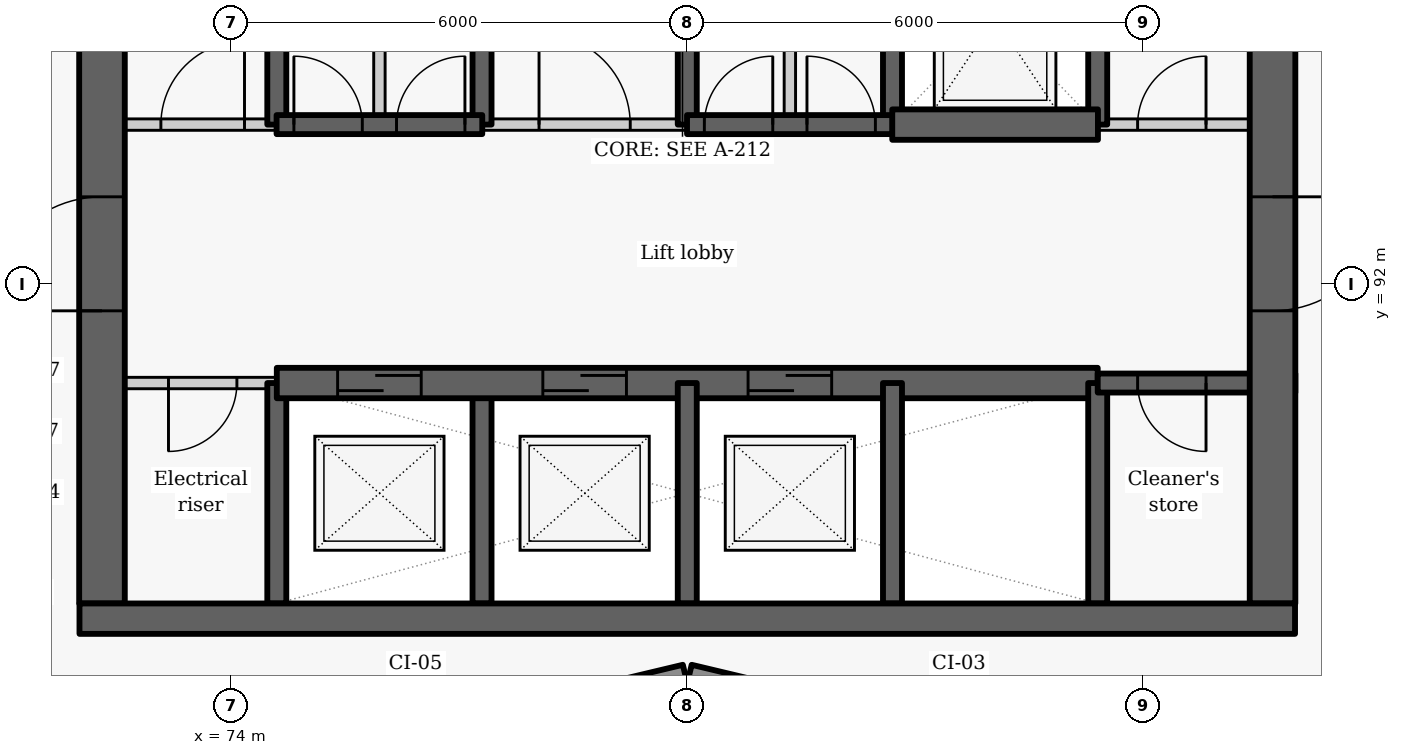
"""IFC4 building model, lengths in metres.
Left out: names, types, materials, properties, quantities, classifications, styles, units other than length and angle.
Written with IfcOpenShell. Run it as: python <this file> out.ifc"""

import sys

from ifc_helpers import new_model, si_unit, direction, frame, frame_2d, origin, place, context, subcontext, project, spatial, rectangle, extrude, element, fill, save


model = new_model("IFC4")
c1 = context("Model", 3, precision=1e-05, world=origin(), true_north=direction((0.0, 1.0)))
c2 = subcontext(c1, "Body", "Model", "MODEL_VIEW")
j1 = project(units=[si_unit("LENGTHUNIT", "METRE"), si_unit("PLANEANGLEUNIT", "RADIAN")], contexts=[c1])
p1 = place(None, origin())
s1 = spatial("IfcSite", under=j1, at=p1, CompositionType="ELEMENT")
p2 = place(p1, origin())
s2 = spatial("IfcBuilding", under=s1, at=p2, CompositionType="ELEMENT")
p3 = place(p2, frame((0.0, 0.0, 51.3)))
s3 = spatial("IfcBuildingStorey", under=s2, at=p3, CompositionType="ELEMENT", Elevation=51.3)
for number, where, z_axis, x_axis in (
    (1, (76.814, 86.119, 0.0), (0.0, 0.0, 1.0), (0.973, 0.232, 0.0)),
    (2, (80.029, 86.872, 0.0), (0.0, 0.0, 1.0), (0.973, -0.232, 0.0)),
):
    element("IfcWall", number, at=place(p3, frame(where, z_axis=z_axis, x_axis=x_axis)), inside=s3, PredefinedType="SOLIDWALL", context=c2, shape_type="SweptSolid", body=[
        extrude(rectangle(XDim=3.246, YDim=0.25, at=frame_2d((1.623, 0.0))), origin(), (0.0, 0.0, 1.0), 2.425),
    ])
p4 = place(p3, frame((74.6, 87.8, -0.275), z_axis=(0.0, 0.0, 1.0), x_axis=(0.0, 1.0, 0.0)))
e3 = element("IfcWall", 3, at=p4, inside=s3, PredefinedType="SHEAR", context=c2, shape_type="SweptSolid", body=[
    extrude(rectangle(XDim=2.9, YDim=0.25, at=frame_2d((1.45, 0.0))), origin(), (0.0, 0.0, 1.0), 3.3),
])
p5 = place(p3, frame((74.6, 94.1, -0.275), z_axis=(0.0, 0.0, 1.0), x_axis=(0.0, 1.0, 0.0)))
e4 = element("IfcWall", 4, at=p5, inside=s3, PredefinedType="SHEAR", context=c2, shape_type="SweptSolid", body=[
    extrude(rectangle(XDim=2.8, YDim=0.25, at=frame_2d((1.4, 0.0))), origin(), (0.0, 0.0, 1.0), 3.3),
])
p6 = place(p3, frame((74.6, 90.7, 0.0), z_axis=(0.0, 0.0, 1.0), x_axis=(-1.0, 0.0, 0.0)))
e5 = element("IfcWall", 5, at=p6, inside=s3, PredefinedType="PARTITIONING", context=c2, shape_type="SweptSolid", body=[
    extrude(rectangle(XDim=2.6, YDim=0.15, at=frame_2d((1.3, 0.0))), origin(), (0.0, 0.0, 1.0), 3.025),
])
p7 = place(p6, frame((0.525, 0.0, 0.0)))
e6 = element("IfcOpeningElement", 6, at=p7, cuts=e5, PredefinedType="OPENING", context=c2, shape_type="SweptSolid", body=[
    extrude(rectangle(XDim=0.9, YDim=2.1, at=frame_2d((0.45, 1.05))), frame((0.0, 0.085, 0.0), z_axis=(0.0, -1.0, 0.0), x_axis=(1.0, 0.0, 0.0)), (0.0, 0.0, 1.0), 0.17),
])
p8 = place(p3, frame((72.3, 87.8, -0.275), z_axis=(0.0, 0.0, 1.0), x_axis=(0.0, 1.0, 0.0)))
e7 = element("IfcWall", 7, at=p8, inside=s3, PredefinedType="SHEAR", context=c2, shape_type="SweptSolid", body=[
    extrude(rectangle(XDim=9.1, YDim=0.6, at=frame_2d((4.55, 0.0))), origin(), (0.0, 0.0, 1.0), 3.3),
])
p9 = place(p8, frame((3.85, 0.0, 0.275)))
e8 = element("IfcOpeningElement", 8, at=p9, cuts=e7, PredefinedType="OPENING", context=c2, shape_type="SweptSolid", body=[
    extrude(rectangle(XDim=1.5, YDim=2.1, at=frame_2d((0.75, 1.05))), frame((0.0, 0.31, 0.0), z_axis=(0.0, -1.0, 0.0), x_axis=(1.0, 0.0, 0.0)), (0.0, 0.0, 1.0), 0.62),
])
p10 = place(p3, frame((77.3, 87.8, -0.275), z_axis=(0.0, 0.0, 1.0), x_axis=(0.0, 1.0, 0.0)))
e9 = element("IfcWall", 9, at=p10, inside=s3, PredefinedType="SHEAR", context=c2, shape_type="SweptSolid", body=[
    extrude(rectangle(XDim=2.9, YDim=0.25, at=frame_2d((1.45, 0.0))), origin(), (0.0, 0.0, 1.0), 3.3),
])
p11 = place(p3, frame((77.3, 94.1, -0.275), z_axis=(0.0, 0.0, 1.0), x_axis=(0.0, 1.0, 0.0)))
e10 = element("IfcWall", 10, at=p11, inside=s3, PredefinedType="SHEAR", context=c2, shape_type="SweptSolid", body=[
    extrude(rectangle(XDim=2.8, YDim=0.25, at=frame_2d((1.4, 0.0))), origin(), (0.0, 0.0, 1.0), 3.3),
])
p12 = place(p3, frame((74.6, 90.7, -0.275), z_axis=(0.0, 0.0, 1.0), x_axis=(1.0, 0.0, 0.0)))
e11 = element("IfcWall", 11, at=p12, inside=s3, PredefinedType="SHEAR", context=c2, shape_type="SweptSolid", body=[
    extrude(rectangle(XDim=10.8, YDim=0.4, at=frame_2d((5.4, 0.0))), origin(), (0.0, 0.0, 1.0), 3.3),
])
p13 = place(p12, frame((0.8, 0.0, 0.275)))
e12 = element("IfcOpeningElement", 12, at=p13, cuts=e11, PredefinedType="OPENING", context=c2, shape_type="SweptSolid", body=[
    extrude(rectangle(XDim=1.1, YDim=2.1, at=frame_2d((0.55, 1.05))), frame((0.0, 0.21, 0.0), z_axis=(0.0, -1.0, 0.0), x_axis=(1.0, 0.0, 0.0)), (0.0, 0.0, 1.0), 0.42),
])
p14 = place(p12, frame((3.5, 0.0, 0.275)))
e13 = element("IfcOpeningElement", 13, at=p14, cuts=e11, PredefinedType="OPENING", context=c2, shape_type="SweptSolid", body=[
    extrude(rectangle(XDim=1.1, YDim=2.1, at=frame_2d((0.55, 1.05))), frame((0.0, 0.21, 0.0), z_axis=(0.0, -1.0, 0.0), x_axis=(1.0, 0.0, 0.0)), (0.0, 0.0, 1.0), 0.42),
])
p15 = place(p12, frame((6.2, 0.0, 0.275)))
e14 = element("IfcOpeningElement", 14, at=p15, cuts=e11, PredefinedType="OPENING", context=c2, shape_type="SweptSolid", body=[
    extrude(rectangle(XDim=1.1, YDim=2.1, at=frame_2d((0.55, 1.05))), frame((0.0, 0.21, 0.0), z_axis=(0.0, -1.0, 0.0), x_axis=(1.0, 0.0, 0.0)), (0.0, 0.0, 1.0), 0.42),
])
p16 = place(p3, frame((80.0, 87.8, -0.275), z_axis=(0.0, 0.0, 1.0), x_axis=(0.0, 1.0, 0.0)))
e15 = element("IfcWall", 15, at=p16, inside=s3, PredefinedType="SHEAR", context=c2, shape_type="SweptSolid", body=[
    extrude(rectangle(XDim=2.9, YDim=0.25, at=frame_2d((1.45, 0.0))), origin(), (0.0, 0.0, 1.0), 3.3),
])
p17 = place(p3, frame((80.0, 94.1, -0.275), z_axis=(0.0, 0.0, 1.0), x_axis=(0.0, 1.0, 0.0)))
e16 = element("IfcWall", 16, at=p17, inside=s3, PredefinedType="SHEAR", context=c2, shape_type="SweptSolid", body=[
    extrude(rectangle(XDim=2.8, YDim=0.25, at=frame_2d((1.4, 0.0))), origin(), (0.0, 0.0, 1.0), 3.3),
])
p18 = place(p3, frame((82.7, 87.8, -0.275), z_axis=(0.0, 0.0, 1.0), x_axis=(0.0, 1.0, 0.0)))
e17 = element("IfcWall", 17, at=p18, inside=s3, PredefinedType="SHEAR", context=c2, shape_type="SweptSolid", body=[
    extrude(rectangle(XDim=2.9, YDim=0.25, at=frame_2d((1.45, 0.0))), origin(), (0.0, 0.0, 1.0), 3.3),
])
p19 = place(p3, frame((82.7, 94.1, -0.275), z_axis=(0.0, 0.0, 1.0), x_axis=(0.0, 1.0, 0.0)))
e18 = element("IfcWall", 18, at=p19, inside=s3, PredefinedType="SHEAR", context=c2, shape_type="SweptSolid", body=[
    extrude(rectangle(XDim=2.8, YDim=0.25, at=frame_2d((1.4, 0.0))), origin(), (0.0, 0.0, 1.0), 3.3),
])
p20 = place(p3, frame((85.4, 87.8, -0.275), z_axis=(0.0, 0.0, 1.0), x_axis=(0.0, 1.0, 0.0)))
e19 = element("IfcWall", 19, at=p20, inside=s3, PredefinedType="SHEAR", context=c2, shape_type="SweptSolid", body=[
    extrude(rectangle(XDim=2.9, YDim=0.25, at=frame_2d((1.45, 0.0))), origin(), (0.0, 0.0, 1.0), 3.3),
])
p21 = place(p3, frame((85.4, 94.1, -0.275), z_axis=(0.0, 0.0, 1.0), x_axis=(0.0, 1.0, 0.0)))
e20 = element("IfcWall", 20, at=p21, inside=s3, PredefinedType="SHEAR", context=c2, shape_type="SweptSolid", body=[
    extrude(rectangle(XDim=2.8, YDim=0.25, at=frame_2d((1.4, 0.0))), origin(), (0.0, 0.0, 1.0), 3.3),
])
p22 = place(p3, frame((88.0, 90.7, -0.275), z_axis=(0.0, 0.0, 1.0), x_axis=(-1.0, 0.0, 0.0)))
e21 = element("IfcWall", 21, at=p22, inside=s3, PredefinedType="SHEAR", context=c2, shape_type="SweptSolid", body=[
    extrude(rectangle(XDim=2.6, YDim=0.25, at=frame_2d((1.3, 0.0))), origin(), (0.0, 0.0, 1.0), 3.3),
])
p23 = place(p22, frame((1.175, 0.0, 0.275)))
e22 = element("IfcOpeningElement", 22, at=p23, cuts=e21, PredefinedType="OPENING", context=c2, shape_type="SweptSolid", body=[
    extrude(rectangle(XDim=0.9, YDim=2.1, at=frame_2d((0.45, 1.05))), frame((0.0, 0.135, 0.0), z_axis=(0.0, -1.0, 0.0), x_axis=(1.0, 0.0, 0.0)), (0.0, 0.0, 1.0), 0.27),
])
p24 = place(p3, frame((87.7, 103.4, -0.275), z_axis=(0.0, 0.0, 1.0), x_axis=(0.0, -1.0, 0.0)))
e23 = element("IfcWall", 23, at=p24, inside=s3, PredefinedType="SHEAR", context=c2, shape_type="SweptSolid", body=[
    extrude(rectangle(XDim=15.6, YDim=0.6, at=frame_2d((7.8, 0.0))), origin(), (0.0, 0.0, 1.0), 3.3),
])
p25 = place(p24, frame((10.25, 0.0, 0.275)))
e24 = element("IfcOpeningElement", 24, at=p25, cuts=e23, PredefinedType="OPENING", context=c2, shape_type="SweptSolid", body=[
    extrude(rectangle(XDim=1.5, YDim=2.1, at=frame_2d((0.75, 1.05))), frame((0.0, 0.31, 0.0), z_axis=(0.0, -1.0, 0.0), x_axis=(1.0, 0.0, 0.0)), (0.0, 0.0, 1.0), 0.62),
])
p26 = place(p24, frame((2.7, 0.0, 0.275)))
e25 = element("IfcOpeningElement", 25, at=p26, cuts=e23, PredefinedType="OPENING", context=c2, shape_type="SweptSolid", body=[
    extrude(rectangle(XDim=1.1, YDim=2.1, at=frame_2d((0.55, 1.05))), frame((0.0, 0.31, 0.0), z_axis=(0.0, -1.0, 0.0), x_axis=(1.0, 0.0, 0.0)), (0.0, 0.0, 1.0), 0.62),
])
p27 = place(p3, frame((72.0, 94.1, 0.0), z_axis=(0.0, 0.0, 1.0), x_axis=(1.0, 0.0, 0.0)))
e26 = element("IfcWall", 26, at=p27, inside=s3, PredefinedType="PARTITIONING", context=c2, shape_type="SweptSolid", body=[
    extrude(rectangle(XDim=2.603, YDim=0.15, at=frame_2d((1.302, 0.0))), origin(), (0.0, 0.0, 1.0), 3.025),
])
p28 = place(p27, frame((1.075, 0.0, 0.0)))
e27 = element("IfcOpeningElement", 27, at=p28, cuts=e26, PredefinedType="OPENING", context=c2, shape_type="SweptSolid", body=[
    extrude(rectangle(XDim=1.1, YDim=2.1, at=frame_2d((0.55, 1.05))), frame((0.0, 0.085, 0.0), z_axis=(0.0, -1.0, 0.0), x_axis=(1.0, 0.0, 0.0)), (0.0, 0.0, 1.0), 0.17),
])
p29 = place(p3, frame((77.297, 94.1, 0.0), z_axis=(0.0, 0.0, 1.0), x_axis=(1.0, 0.0, 0.0)))
e28 = element("IfcWall", 28, at=p29, inside=s3, PredefinedType="PARTITIONING", context=c2, shape_type="SweptSolid", body=[
    extrude(rectangle(XDim=2.706, YDim=0.15, at=frame_2d((1.353, 0.0))), origin(), (0.0, 0.0, 1.0), 3.025),
])
p30 = place(p29, frame((0.753, 0.0, 0.0)))
e29 = element("IfcOpeningElement", 29, at=p30, cuts=e28, PredefinedType="OPENING", context=c2, shape_type="SweptSolid", body=[
    extrude(rectangle(XDim=1.2, YDim=2.1, at=frame_2d((0.6, 1.05))), frame((0.0, 0.085, 0.0), z_axis=(0.0, -1.0, 0.0), x_axis=(1.0, 0.0, 0.0)), (0.0, 0.0, 1.0), 0.17),
])
p31 = place(p3, frame((85.397, 94.1, 0.0), z_axis=(0.0, 0.0, 1.0), x_axis=(1.0, 0.0, 0.0)))
e30 = element("IfcWall", 30, at=p31, inside=s3, PredefinedType="PARTITIONING", context=c2, shape_type="SweptSolid", body=[
    extrude(rectangle(XDim=2.603, YDim=0.15, at=frame_2d((1.302, 0.0))), origin(), (0.0, 0.0, 1.0), 3.025),
])
p32 = place(p31, frame((0.528, 0.0, 0.0)))
e31 = element("IfcOpeningElement", 31, at=p32, cuts=e30, PredefinedType="OPENING", context=c2, shape_type="SweptSolid", body=[
    extrude(rectangle(XDim=0.9, YDim=2.1, at=frame_2d((0.45, 1.05))), frame((0.0, 0.085, 0.0), z_axis=(0.0, -1.0, 0.0), x_axis=(1.0, 0.0, 0.0)), (0.0, 0.0, 1.0), 0.17),
])
p33 = place(p3, frame((74.597, 94.1, -0.275), z_axis=(0.0, 0.0, 1.0), x_axis=(1.0, 0.0, 0.0)))
e32 = element("IfcWall", 32, at=p33, inside=s3, PredefinedType="SHEAR", context=c2, shape_type="SweptSolid", body=[
    extrude(rectangle(XDim=2.706, YDim=0.25, at=frame_2d((1.353, 0.0))), origin(), (0.0, 0.0, 1.0), 3.3),
])
p34 = place(p33, frame((0.228, 0.0, 0.275)))
e33 = element("IfcOpeningElement", 33, at=p34, cuts=e32, PredefinedType="OPENING", context=c2, shape_type="SweptSolid", body=[
    extrude(rectangle(XDim=0.9, YDim=2.1, at=frame_2d((0.45, 1.05))), frame((0.0, 0.135, 0.0), z_axis=(0.0, -1.0, 0.0), x_axis=(1.0, 0.0, 0.0)), (0.0, 0.0, 1.0), 0.27),
])
p35 = place(p33, frame((1.578, 0.0, 0.275)))
e34 = element("IfcOpeningElement", 34, at=p35, cuts=e32, PredefinedType="OPENING", context=c2, shape_type="SweptSolid", body=[
    extrude(rectangle(XDim=0.9, YDim=2.1, at=frame_2d((0.45, 1.05))), frame((0.0, 0.135, 0.0), z_axis=(0.0, -1.0, 0.0), x_axis=(1.0, 0.0, 0.0)), (0.0, 0.0, 1.0), 0.27),
])
p36 = place(p3, frame((79.997, 94.1, -0.275), z_axis=(0.0, 0.0, 1.0), x_axis=(1.0, 0.0, 0.0)))
e35 = element("IfcWall", 35, at=p36, inside=s3, PredefinedType="SHEAR", context=c2, shape_type="SweptSolid", body=[
    extrude(rectangle(XDim=2.706, YDim=0.25, at=frame_2d((1.353, 0.0))), origin(), (0.0, 0.0, 1.0), 3.3),
])
p37 = place(p36, frame((0.228, 0.0, 0.275)))
e36 = element("IfcOpeningElement", 36, at=p37, cuts=e35, PredefinedType="OPENING", context=c2, shape_type="SweptSolid", body=[
    extrude(rectangle(XDim=0.9, YDim=2.1, at=frame_2d((0.45, 1.05))), frame((0.0, 0.135, 0.0), z_axis=(0.0, -1.0, 0.0), x_axis=(1.0, 0.0, 0.0)), (0.0, 0.0, 1.0), 0.27),
])
p38 = place(p36, frame((1.578, 0.0, 0.275)))
e37 = element("IfcOpeningElement", 37, at=p38, cuts=e35, PredefinedType="OPENING", context=c2, shape_type="SweptSolid", body=[
    extrude(rectangle(XDim=0.9, YDim=2.1, at=frame_2d((0.45, 1.05))), frame((0.0, 0.135, 0.0), z_axis=(0.0, -1.0, 0.0), x_axis=(1.0, 0.0, 0.0)), (0.0, 0.0, 1.0), 0.27),
])
p39 = place(p3, frame((82.697, 94.1, -0.275), z_axis=(0.0, 0.0, 1.0), x_axis=(1.0, 0.0, 0.0)))
e38 = element("IfcWall", 38, at=p39, inside=s3, PredefinedType="SHEAR", context=c2, shape_type="SweptSolid", body=[
    extrude(rectangle(XDim=2.706, YDim=0.4, at=frame_2d((1.353, 0.0))), origin(), (0.0, 0.0, 1.0), 3.3),
])
for number, where, z_axis, x_axis in (
    (39, (75.95, 94.1, 0.0), (0.0, 0.0, 1.0), (0.0, 1.0, 0.0)),
    (40, (81.35, 94.1, 0.0), (0.0, 0.0, 1.0), (0.0, 1.0, 0.0)),
):
    element("IfcWall", number, at=place(p3, frame(where, z_axis=z_axis, x_axis=x_axis)), inside=s3, PredefinedType="PARTITIONING", context=c2, shape_type="SweptSolid", body=[
        extrude(rectangle(XDim=2.8, YDim=0.15, at=frame_2d((1.4, 0.0))), origin(), (0.0, 0.0, 1.0), 3.025),
    ])
p40 = place(p3, frame((72.004, 87.6, -0.275), z_axis=(0.0, 0.0, 1.0), x_axis=(1.0, 0.0, 0.0)))
e41 = element("IfcWall", 41, at=p40, inside=s3, PredefinedType="SHEAR", context=c2, shape_type="SweptSolid", body=[
    extrude(rectangle(XDim=15.992, YDim=0.4, at=frame_2d((7.996, 0.0))), origin(), (0.0, 0.0, 1.0), 3.3),
])
p41 = place(p7, origin())
e42 = element("IfcDoor", 42, at=p41, inside=s3, OperationType="SINGLE_SWING_RIGHT", PredefinedType="DOOR", context=c2, shape_type="SweptSolid", body=[
    extrude(rectangle(XDim=0.9, YDim=2.1, at=frame_2d((0.45, 1.05))), frame((0.0, 0.025, 0.0), z_axis=(0.0, -1.0, 0.0), x_axis=(1.0, 0.0, 0.0)), (0.0, 0.0, 1.0), 0.05),
])
fill(e6, e42)
p42 = place(p13, origin())
e43 = element("IfcDoor", 43, at=p42, inside=s3, OperationType="SLIDING_TO_LEFT", PredefinedType="DOOR", context=c2, shape_type="SweptSolid", body=[
    extrude(rectangle(XDim=1.1, YDim=2.1, at=frame_2d((0.55, 1.05))), frame((0.0, 0.025, 0.0), z_axis=(0.0, -1.0, 0.0), x_axis=(1.0, 0.0, 0.0)), (0.0, 0.0, 1.0), 0.05),
])
fill(e12, e43)
p43 = place(p14, origin())
e44 = element("IfcDoor", 44, at=p43, inside=s3, OperationType="SLIDING_TO_LEFT", PredefinedType="DOOR", context=c2, shape_type="SweptSolid", body=[
    extrude(rectangle(XDim=1.1, YDim=2.1, at=frame_2d((0.55, 1.05))), frame((0.0, 0.025, 0.0), z_axis=(0.0, -1.0, 0.0), x_axis=(1.0, 0.0, 0.0)), (0.0, 0.0, 1.0), 0.05),
])
fill(e13, e44)
p44 = place(p15, origin())
e45 = element("IfcDoor", 45, at=p44, inside=s3, OperationType="SLIDING_TO_LEFT", PredefinedType="DOOR", context=c2, shape_type="SweptSolid", body=[
    extrude(rectangle(XDim=1.1, YDim=2.1, at=frame_2d((0.55, 1.05))), frame((0.0, 0.025, 0.0), z_axis=(0.0, -1.0, 0.0), x_axis=(1.0, 0.0, 0.0)), (0.0, 0.0, 1.0), 0.05),
])
fill(e14, e45)
p45 = place(p23, origin())
e46 = element("IfcDoor", 46, at=p45, inside=s3, OperationType="SINGLE_SWING_LEFT", PredefinedType="DOOR", context=c2, shape_type="SweptSolid", body=[
    extrude(rectangle(XDim=0.9, YDim=2.1, at=frame_2d((0.45, 1.05))), frame((0.0, 0.025, 0.0), z_axis=(0.0, -1.0, 0.0), x_axis=(1.0, 0.0, 0.0)), (0.0, 0.0, 1.0), 0.05),
])
fill(e22, e46)
p46 = place(p28, origin())
e47 = element("IfcDoor", 47, at=p46, inside=s3, OperationType="SINGLE_SWING_RIGHT", PredefinedType="DOOR", context=c2, shape_type="SweptSolid", body=[
    extrude(rectangle(XDim=1.1, YDim=2.1, at=frame_2d((0.55, 1.05))), frame((0.0, 0.025, 0.0), z_axis=(0.0, -1.0, 0.0), x_axis=(1.0, 0.0, 0.0)), (0.0, 0.0, 1.0), 0.05),
])
fill(e27, e47)
p47 = place(p34, origin())
e48 = element("IfcDoor", 48, at=p47, inside=s3, OperationType="SINGLE_SWING_LEFT", PredefinedType="DOOR", context=c2, shape_type="SweptSolid", body=[
    extrude(rectangle(XDim=0.9, YDim=2.1, at=frame_2d((0.45, 1.05))), frame((0.0, 0.025, 0.0), z_axis=(0.0, -1.0, 0.0), x_axis=(1.0, 0.0, 0.0)), (0.0, 0.0, 1.0), 0.05),
])
fill(e33, e48)
p48 = place(p35, origin())
e49 = element("IfcDoor", 49, at=p48, inside=s3, OperationType="SINGLE_SWING_RIGHT", PredefinedType="DOOR", context=c2, shape_type="SweptSolid", body=[
    extrude(rectangle(XDim=0.9, YDim=2.1, at=frame_2d((0.45, 1.05))), frame((0.0, 0.025, 0.0), z_axis=(0.0, -1.0, 0.0), x_axis=(1.0, 0.0, 0.0)), (0.0, 0.0, 1.0), 0.05),
])
fill(e34, e49)
p49 = place(p30, origin())
e50 = element("IfcDoor", 50, at=p49, inside=s3, OperationType="DOUBLE_DOOR_SINGLE_SWING", PredefinedType="DOOR", context=c2, shape_type="SweptSolid", body=[
    extrude(rectangle(XDim=1.2, YDim=2.1, at=frame_2d((0.6, 1.05))), frame((0.0, 0.025, 0.0), z_axis=(0.0, -1.0, 0.0), x_axis=(1.0, 0.0, 0.0)), (0.0, 0.0, 1.0), 0.05),
])
fill(e29, e50)
p50 = place(p37, origin())
e51 = element("IfcDoor", 51, at=p50, inside=s3, OperationType="SINGLE_SWING_RIGHT", PredefinedType="DOOR", context=c2, shape_type="SweptSolid", body=[
    extrude(rectangle(XDim=0.9, YDim=2.1, at=frame_2d((0.45, 1.05))), frame((0.0, 0.025, 0.0), z_axis=(0.0, -1.0, 0.0), x_axis=(1.0, 0.0, 0.0)), (0.0, 0.0, 1.0), 0.05),
])
fill(e36, e51)
p51 = place(p38, origin())
e52 = element("IfcDoor", 52, at=p51, inside=s3, OperationType="SINGLE_SWING_LEFT", PredefinedType="DOOR", context=c2, shape_type="SweptSolid", body=[
    extrude(rectangle(XDim=0.9, YDim=2.1, at=frame_2d((0.45, 1.05))), frame((0.0, 0.025, 0.0), z_axis=(0.0, -1.0, 0.0), x_axis=(1.0, 0.0, 0.0)), (0.0, 0.0, 1.0), 0.05),
])
fill(e37, e52)
p52 = place(p32, origin())
e53 = element("IfcDoor", 53, at=p52, inside=s3, OperationType="SINGLE_SWING_RIGHT", PredefinedType="DOOR", context=c2, shape_type="SweptSolid", body=[
    extrude(rectangle(XDim=0.9, YDim=2.1, at=frame_2d((0.45, 1.05))), frame((0.0, 0.025, 0.0), z_axis=(0.0, -1.0, 0.0), x_axis=(1.0, 0.0, 0.0)), (0.0, 0.0, 1.0), 0.05),
])
fill(e31, e53)
p53 = place(p25, origin())
e54 = element("IfcDoor", 54, at=p53, inside=s3, OperationType="DOUBLE_DOOR_SINGLE_SWING", PredefinedType="DOOR", context=c2, shape_type="SweptSolid", body=[
    extrude(rectangle(XDim=1.5, YDim=2.1, at=frame_2d((0.75, 1.05))), frame((0.0, 0.025, 0.0), z_axis=(0.0, -1.0, 0.0), x_axis=(1.0, 0.0, 0.0)), (0.0, 0.0, 1.0), 0.05),
])
fill(e24, e54)
p54 = place(p9, origin())
e55 = element("IfcDoor", 55, at=p54, inside=s3, OperationType="DOUBLE_DOOR_SINGLE_SWING", PredefinedType="DOOR", context=c2, shape_type="SweptSolid", body=[
    extrude(rectangle(XDim=1.5, YDim=2.1, at=frame_2d((0.75, 1.05))), frame((0.0, 0.025, 0.0), z_axis=(0.0, -1.0, 0.0), x_axis=(1.0, 0.0, 0.0)), (0.0, 0.0, 1.0), 0.05),
])
fill(e8, e55)
save(model, sys.argv[1])
